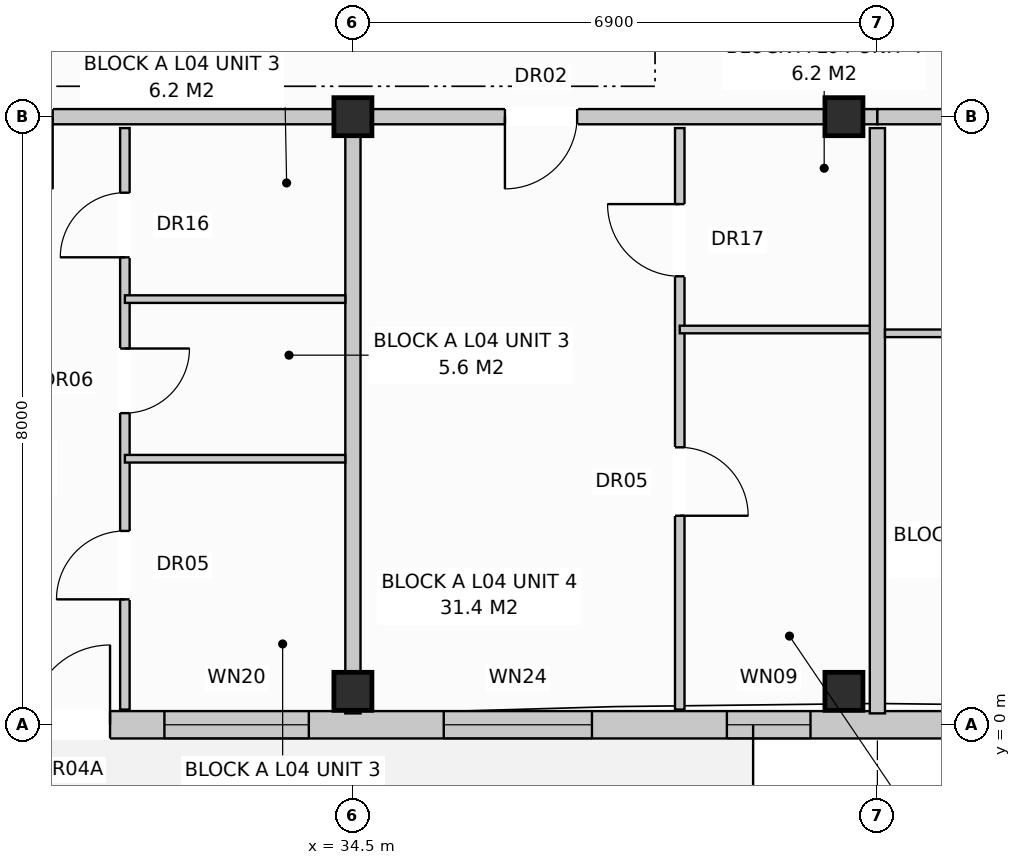
"""IFC4 building model, lengths in metres.
Left out: names, types, materials, properties, quantities, classifications, styles, units other than length and angle.
Written with IfcOpenShell. Run it as: python <this file> out.ifc"""

import sys

from ifc_helpers import new_model, si_unit, direction, frame, frame_2d, origin, origin_with_axes, origin_2d, place, context, subcontext, project, spatial, rectangle, extrude, element, fill, save


model = new_model("IFC4")
c1 = context("Model", 3, precision=1e-05, world=origin(), true_north=direction((0.0, 1.0)))
c2 = subcontext(c1, "Body", "Model", "MODEL_VIEW")
j1 = project(units=[si_unit("LENGTHUNIT", "METRE"), si_unit("PLANEANGLEUNIT", "RADIAN")], contexts=[c1])
p1 = place(None, origin())
s1 = spatial("IfcSite", under=j1, at=p1, CompositionType="ELEMENT")
p2 = place(p1, origin())
s2 = spatial("IfcBuilding", under=s1, at=p2, CompositionType="ELEMENT")
p3 = place(p2, frame((0.0, 0.0, 14.4)))
s3 = spatial("IfcBuildingStorey", under=s2, at=p3, CompositionType="ELEMENT", Elevation=14.4)
for number, where, z_axis, x_axis in (
    (1, (34.5, 0.44, 0.0), (0.0, 0.0, 1.0), (1.0, 0.0, 0.0)),
    (2, (34.5, 8.0, 0.0), (0.0, 0.0, 1.0), (1.0, 0.0, 0.0)),
    (3, (40.96, 0.44, 0.0), (0.0, 0.0, 1.0), (1.0, 0.0, 0.0)),
    (4, (40.96, 8.0, 0.0), (0.0, 0.0, 1.0), (1.0, 0.0, 0.0)),
):
    element("IfcColumn", number, at=place(p3, frame(where, z_axis=z_axis, x_axis=x_axis)), inside=s3, PredefinedType="COLUMN", context=c2, shape_type="SweptSolid", body=[
        extrude(rectangle(XDim=0.5, YDim=0.5, at=origin_2d()), origin(), (0.0, 0.0, 1.0), 3.2),
    ])
p4 = place(p3, frame((0.17, 0.0, 0.0), z_axis=(0.0, 0.0, 1.0), x_axis=(1.0, 0.0, 0.0)))
e5 = element("IfcWall", 5, at=p4, inside=s3, PredefinedType="STANDARD", context=c2, shape_type="SweptSolid", body=[
    extrude(rectangle(XDim=54.86, YDim=0.36, at=frame_2d((27.43, 0.0))), origin(), (0.0, 0.0, 1.0), 2.94),
])
p5 = place(p4, frame((2.485, 0.0, 0.0)))
e6 = element("IfcOpeningElement", 6, at=p5, cuts=e5, PredefinedType="OPENING", context=c2, shape_type="SweptSolid", body=[
    extrude(rectangle(XDim=1.05, YDim=2.12, at=frame_2d((0.525, 1.06))), frame((0.0, 0.192, 0.0), z_axis=(0.0, -1.0, 0.0), x_axis=(1.0, 0.0, 0.0)), (0.0, 0.0, 1.0), 0.384),
])
p6 = place(p4, frame((16.985, 0.0, 0.0)))
e7 = element("IfcOpeningElement", 7, at=p6, cuts=e5, PredefinedType="OPENING", context=c2, shape_type="SweptSolid", body=[
    extrude(rectangle(XDim=1.05, YDim=2.12, at=frame_2d((0.525, 1.06))), frame((0.0, 0.192, 0.0), z_axis=(0.0, -1.0, 0.0), x_axis=(1.0, 0.0, 0.0)), (0.0, 0.0, 1.0), 0.384),
])
p7 = place(p4, frame((30.085, 0.0, 0.0)))
e8 = element("IfcOpeningElement", 8, at=p7, cuts=e5, PredefinedType="OPENING", context=c2, shape_type="SweptSolid", body=[
    extrude(rectangle(XDim=1.05, YDim=2.12, at=frame_2d((0.525, 1.06))), frame((0.0, 0.192, 0.0), z_axis=(0.0, -1.0, 0.0), x_axis=(1.0, 0.0, 0.0)), (0.0, 0.0, 1.0), 0.384),
])
p8 = place(p4, frame((44.141, 0.0, 0.0)))
e9 = element("IfcOpeningElement", 9, at=p8, cuts=e5, PredefinedType="OPENING", context=c2, shape_type="SweptSolid", body=[
    extrude(rectangle(XDim=1.05, YDim=2.12, at=frame_2d((0.525, 1.06))), frame((0.0, 0.192, 0.0), z_axis=(0.0, -1.0, 0.0), x_axis=(1.0, 0.0, 0.0)), (0.0, 0.0, 1.0), 0.384),
])
p9 = place(p4, frame((0.75, 0.0, 0.72)))
e10 = element("IfcOpeningElement", 10, at=p9, cuts=e5, PredefinedType="OPENING", context=c2, shape_type="SweptSolid", body=[
    extrude(rectangle(XDim=1.1, YDim=1.5, at=frame_2d((0.55, 0.75))), frame((0.0, 0.192, 0.0), z_axis=(0.0, -1.0, 0.0), x_axis=(1.0, 0.0, 0.0)), (0.0, 0.0, 1.0), 0.384),
])
p10 = place(p4, frame((4.25, 0.0, 0.72)))
e11 = element("IfcOpeningElement", 11, at=p10, cuts=e5, PredefinedType="OPENING", context=c2, shape_type="SweptSolid", body=[
    extrude(rectangle(XDim=1.9, YDim=1.85, at=frame_2d((0.95, 0.925))), frame((0.0, 0.192, 0.0), z_axis=(0.0, -1.0, 0.0), x_axis=(1.0, 0.0, 0.0)), (0.0, 0.0, 1.0), 0.384),
])
p11 = place(p4, frame((8.925, 0.0, 0.8)))
e12 = element("IfcOpeningElement", 12, at=p11, cuts=e5, PredefinedType="OPENING", context=c2, shape_type="SweptSolid", body=[
    extrude(rectangle(XDim=1.95, YDim=1.65, at=frame_2d((0.975, 0.825))), frame((0.0, 0.192, 0.0), z_axis=(0.0, -1.0, 0.0), x_axis=(1.0, 0.0, 0.0)), (0.0, 0.0, 1.0), 0.384),
])
p12 = place(p4, frame((15.05, 0.0, 0.72)))
e13 = element("IfcOpeningElement", 13, at=p12, cuts=e5, PredefinedType="OPENING", context=c2, shape_type="SweptSolid", body=[
    extrude(rectangle(XDim=1.1, YDim=1.5, at=frame_2d((0.55, 0.75))), frame((0.0, 0.192, 0.0), z_axis=(0.0, -1.0, 0.0), x_axis=(1.0, 0.0, 0.0)), (0.0, 0.0, 1.0), 0.384),
])
p13 = place(p4, frame((21.05, 0.0, 0.72)))
e14 = element("IfcOpeningElement", 14, at=p13, cuts=e5, PredefinedType="OPENING", context=c2, shape_type="SweptSolid", body=[
    extrude(rectangle(XDim=1.9, YDim=1.85, at=frame_2d((0.95, 0.925))), frame((0.0, 0.192, 0.0), z_axis=(0.0, -1.0, 0.0), x_axis=(1.0, 0.0, 0.0)), (0.0, 0.0, 1.0), 0.384),
])
p14 = place(p4, frame((24.85, 0.0, 0.72)))
e15 = element("IfcOpeningElement", 15, at=p14, cuts=e5, PredefinedType="OPENING", context=c2, shape_type="SweptSolid", body=[
    extrude(rectangle(XDim=1.1, YDim=1.5, at=frame_2d((0.55, 0.75))), frame((0.0, 0.192, 0.0), z_axis=(0.0, -1.0, 0.0), x_axis=(1.0, 0.0, 0.0)), (0.0, 0.0, 1.0), 0.384),
])
p15 = place(p4, frame((28.35, 0.0, 0.72)))
e16 = element("IfcOpeningElement", 16, at=p15, cuts=e5, PredefinedType="OPENING", context=c2, shape_type="SweptSolid", body=[
    extrude(rectangle(XDim=1.1, YDim=1.5, at=frame_2d((0.55, 0.75))), frame((0.0, 0.192, 0.0), z_axis=(0.0, -1.0, 0.0), x_axis=(1.0, 0.0, 0.0)), (0.0, 0.0, 1.0), 0.384),
])
p16 = place(p4, frame((31.85, 0.0, 0.72)))
e17 = element("IfcOpeningElement", 17, at=p16, cuts=e5, PredefinedType="OPENING", context=c2, shape_type="SweptSolid", body=[
    extrude(rectangle(XDim=1.9, YDim=1.85, at=frame_2d((0.95, 0.925))), frame((0.0, 0.192, 0.0), z_axis=(0.0, -1.0, 0.0), x_axis=(1.0, 0.0, 0.0)), (0.0, 0.0, 1.0), 0.384),
])
p17 = place(p4, frame((35.525, 0.0, 0.8)))
e18 = element("IfcOpeningElement", 18, at=p17, cuts=e5, PredefinedType="OPENING", context=c2, shape_type="SweptSolid", body=[
    extrude(rectangle(XDim=1.95, YDim=1.65, at=frame_2d((0.975, 0.825))), frame((0.0, 0.192, 0.0), z_axis=(0.0, -1.0, 0.0), x_axis=(1.0, 0.0, 0.0)), (0.0, 0.0, 1.0), 0.384),
])
p18 = place(p4, frame((39.25, 0.0, 0.72)))
e19 = element("IfcOpeningElement", 19, at=p18, cuts=e5, PredefinedType="OPENING", context=c2, shape_type="SweptSolid", body=[
    extrude(rectangle(XDim=1.1, YDim=1.5, at=frame_2d((0.55, 0.75))), frame((0.0, 0.192, 0.0), z_axis=(0.0, -1.0, 0.0), x_axis=(1.0, 0.0, 0.0)), (0.0, 0.0, 1.0), 0.384),
])
p19 = place(p4, frame((42.35, 0.0, 0.72)))
e20 = element("IfcOpeningElement", 20, at=p19, cuts=e5, PredefinedType="OPENING", context=c2, shape_type="SweptSolid", body=[
    extrude(rectangle(XDim=1.1, YDim=1.5, at=frame_2d((0.55, 0.75))), frame((0.0, 0.192, 0.0), z_axis=(0.0, -1.0, 0.0), x_axis=(1.0, 0.0, 0.0)), (0.0, 0.0, 1.0), 0.384),
])
p20 = place(p4, frame((45.725, 0.0, 0.8)))
e21 = element("IfcOpeningElement", 21, at=p20, cuts=e5, PredefinedType="OPENING", context=c2, shape_type="SweptSolid", body=[
    extrude(rectangle(XDim=1.95, YDim=1.65, at=frame_2d((0.975, 0.825))), frame((0.0, 0.192, 0.0), z_axis=(0.0, -1.0, 0.0), x_axis=(1.0, 0.0, 0.0)), (0.0, 0.0, 1.0), 0.384),
])
p21 = place(p4, frame((51.85, 0.0, 0.72)))
e22 = element("IfcOpeningElement", 22, at=p21, cuts=e5, PredefinedType="OPENING", context=c2, shape_type="SweptSolid", body=[
    extrude(rectangle(XDim=1.1, YDim=1.5, at=frame_2d((0.55, 0.75))), frame((0.0, 0.192, 0.0), z_axis=(0.0, -1.0, 0.0), x_axis=(1.0, 0.0, 0.0)), (0.0, 0.0, 1.0), 0.384),
])
p22 = place(p3, frame((34.5, 7.85, 0.0), z_axis=(0.0, 0.0, 1.0), x_axis=(0.0, -1.0, 0.0)))
e23 = element("IfcWall", 23, at=p22, inside=s3, PredefinedType="PARTITIONING", context=c2, shape_type="SweptSolid", body=[
    extrude(rectangle(XDim=7.7, YDim=0.2, at=frame_2d((3.85, 0.0))), origin(), (0.0, 0.0, 1.0), 2.94),
])
p23 = place(p3, frame((27.6, 8.0, 0.0), z_axis=(0.0, 0.0, 1.0), x_axis=(1.0, 0.0, 0.0)))
e24 = element("IfcWall", 24, at=p23, inside=s3, PredefinedType="PARTITIONING", context=c2, shape_type="SweptSolid", body=[
    extrude(rectangle(XDim=6.9, YDim=0.2, at=frame_2d((3.45, 0.0))), origin(), (0.0, 0.0, 1.0), 2.38),
])
p24 = place(p23, frame((2.0, 0.0, 0.0)))
e25 = element("IfcOpeningElement", 25, at=p24, cuts=e24, PredefinedType="OPENING", context=c2, shape_type="SweptSolid", body=[
    extrude(rectangle(XDim=0.95, YDim=2.15, at=frame_2d((0.475, 1.075))), frame((0.0, 0.112, 0.0), z_axis=(0.0, -1.0, 0.0), x_axis=(1.0, 0.0, 0.0)), (0.0, 0.0, 1.0), 0.224),
])
p25 = place(p3, frame((31.5, 7.85, 0.0), z_axis=(0.0, 0.0, 1.0), x_axis=(0.0, -1.0, 0.0)))
e26 = element("IfcWall", 26, at=p25, inside=s3, PredefinedType="PARTITIONING", context=c2, shape_type="SweptSolid", body=[
    extrude(rectangle(XDim=7.65, YDim=0.125, at=frame_2d((3.825, 0.0))), origin(), (0.0, 0.0, 1.0), 2.94),
])
p26 = place(p25, frame((0.85, 0.0, 0.0)))
e27 = element("IfcOpeningElement", 27, at=p26, cuts=e26, PredefinedType="OPENING", context=c2, shape_type="SweptSolid", body=[
    extrude(rectangle(XDim=0.85, YDim=2.1, at=frame_2d((0.425, 1.05))), frame((0.0, 0.074, 0.0), z_axis=(0.0, -1.0, 0.0), x_axis=(1.0, 0.0, 0.0)), (0.0, 0.0, 1.0), 0.149),
])
p27 = place(p25, frame((2.9, 0.0, 0.0)))
e28 = element("IfcOpeningElement", 28, at=p27, cuts=e26, PredefinedType="OPENING", context=c2, shape_type="SweptSolid", body=[
    extrude(rectangle(XDim=0.85, YDim=2.05, at=frame_2d((0.425, 1.025))), frame((0.0, 0.074, 0.0), z_axis=(0.0, -1.0, 0.0), x_axis=(1.0, 0.0, 0.0)), (0.0, 0.0, 1.0), 0.149),
])
p28 = place(p25, frame((5.3, 0.0, 0.0)))
e29 = element("IfcOpeningElement", 29, at=p28, cuts=e26, PredefinedType="OPENING", context=c2, shape_type="SweptSolid", body=[
    extrude(rectangle(XDim=0.9, YDim=2.1, at=frame_2d((0.45, 1.05))), frame((0.0, 0.074, 0.0), z_axis=(0.0, -1.0, 0.0), x_axis=(1.0, 0.0, 0.0)), (0.0, 0.0, 1.0), 0.149),
])
for number, where, z_axis, x_axis in (
    (30, (31.5, 5.6, 0.0), (0.0, 0.0, 1.0), (1.0, 0.0, 0.0)),
    (31, (31.5, 3.5, 0.0), (0.0, 0.0, 1.0), (1.0, 0.0, 0.0)),
):
    element("IfcWall", number, at=place(p3, frame(where, z_axis=z_axis, x_axis=x_axis)), inside=s3, PredefinedType="PARTITIONING", context=c2, shape_type="SweptSolid", body=[
        extrude(rectangle(XDim=2.9, YDim=0.1, at=frame_2d((1.45, 0.0))), origin(), (0.0, 0.0, 1.0), 2.94),
    ])
p29 = place(p3, frame((41.4, 7.85, 0.0), z_axis=(0.0, 0.0, 1.0), x_axis=(0.0, -1.0, 0.0)))
e32 = element("IfcWall", 32, at=p29, inside=s3, PredefinedType="PARTITIONING", context=c2, shape_type="SweptSolid", body=[
    extrude(rectangle(XDim=7.7, YDim=0.2, at=frame_2d((3.85, 0.0))), origin(), (0.0, 0.0, 1.0), 2.94),
])
p30 = place(p3, frame((34.5, 8.0, 0.0), z_axis=(0.0, 0.0, 1.0), x_axis=(1.0, 0.0, 0.0)))
e33 = element("IfcWall", 33, at=p30, inside=s3, PredefinedType="PARTITIONING", context=c2, shape_type="SweptSolid", body=[
    extrude(rectangle(XDim=6.9, YDim=0.2, at=frame_2d((3.45, 0.0))), origin(), (0.0, 0.0, 1.0), 2.38),
])
p31 = place(p30, frame((2.0, 0.0, 0.0)))
e34 = element("IfcOpeningElement", 34, at=p31, cuts=e33, PredefinedType="OPENING", context=c2, shape_type="SweptSolid", body=[
    extrude(rectangle(XDim=0.95, YDim=2.15, at=frame_2d((0.475, 1.075))), frame((0.0, 0.112, 0.0), z_axis=(0.0, -1.0, 0.0), x_axis=(1.0, 0.0, 0.0)), (0.0, 0.0, 1.0), 0.224),
])
p32 = place(p3, frame((38.8, 7.85, 0.0), z_axis=(0.0, 0.0, 1.0), x_axis=(0.0, -1.0, 0.0)))
e35 = element("IfcWall", 35, at=p32, inside=s3, PredefinedType="PARTITIONING", context=c2, shape_type="SweptSolid", body=[
    extrude(rectangle(XDim=7.65, YDim=0.125, at=frame_2d((3.825, 0.0))), origin(), (0.0, 0.0, 1.0), 2.94),
])
p33 = place(p32, frame((1.0, 0.0, 0.0)))
e36 = element("IfcOpeningElement", 36, at=p33, cuts=e35, PredefinedType="OPENING", context=c2, shape_type="SweptSolid", body=[
    extrude(rectangle(XDim=0.95, YDim=2.1, at=frame_2d((0.475, 1.05))), frame((0.0, 0.074, 0.0), z_axis=(0.0, -1.0, 0.0), x_axis=(1.0, 0.0, 0.0)), (0.0, 0.0, 1.0), 0.149),
])
p34 = place(p32, frame((4.2, 0.0, 0.0)))
e37 = element("IfcOpeningElement", 37, at=p34, cuts=e35, PredefinedType="OPENING", context=c2, shape_type="SweptSolid", body=[
    extrude(rectangle(XDim=0.9, YDim=2.1, at=frame_2d((0.45, 1.05))), frame((0.0, 0.074, 0.0), z_axis=(0.0, -1.0, 0.0), x_axis=(1.0, 0.0, 0.0)), (0.0, 0.0, 1.0), 0.149),
])
p35 = place(p3, frame((38.8, 5.2, 0.0), z_axis=(0.0, 0.0, 1.0), x_axis=(1.0, 0.0, 0.0)))
e38 = element("IfcWall", 38, at=p35, inside=s3, PredefinedType="PARTITIONING", context=c2, shape_type="SweptSolid", body=[
    extrude(rectangle(XDim=2.5, YDim=0.1, at=frame_2d((1.25, 0.0))), origin(), (0.0, 0.0, 1.0), 2.94),
])
p36 = place(p3, frame((41.4, 8.0, 0.0), z_axis=(0.0, 0.0, 1.0), x_axis=(1.0, 0.0, 0.0)))
e39 = element("IfcWall", 39, at=p36, inside=s3, PredefinedType="PARTITIONING", context=c2, shape_type="SweptSolid", body=[
    extrude(rectangle(XDim=13.8, YDim=0.2, at=frame_2d((6.9, 0.0))), origin(), (0.0, 0.0, 1.0), 2.38),
])
p37 = place(p36, frame((9.6, 0.0, 0.0)))
e40 = element("IfcOpeningElement", 40, at=p37, cuts=e39, PredefinedType="OPENING", context=c2, shape_type="SweptSolid", body=[
    extrude(rectangle(XDim=0.95, YDim=2.15, at=frame_2d((0.475, 1.075))), frame((0.0, 0.112, 0.0), z_axis=(0.0, -1.0, 0.0), x_axis=(1.0, 0.0, 0.0)), (0.0, 0.0, 1.0), 0.224),
])
p38 = place(p3, frame((41.5, 5.15, 0.0), z_axis=(0.0, 0.0, 1.0), x_axis=(1.0, 0.0, 0.0)))
e41 = element("IfcWall", 41, at=p38, inside=s3, PredefinedType="PARTITIONING", context=c2, shape_type="SweptSolid", body=[
    extrude(rectangle(XDim=8.6, YDim=0.1, at=frame_2d((4.3, 0.0))), origin(), (0.0, 0.0, 1.0), 2.94),
])
p39 = place(p38, frame((1.4, 0.0, 0.0)))
e42 = element("IfcOpeningElement", 42, at=p39, cuts=e41, PredefinedType="OPENING", context=c2, shape_type="SweptSolid", body=[
    extrude(rectangle(XDim=0.85, YDim=2.05, at=frame_2d((0.425, 1.025))), frame((0.0, 0.062, 0.0), z_axis=(0.0, -1.0, 0.0), x_axis=(1.0, 0.0, 0.0)), (0.0, 0.0, 1.0), 0.124),
])
p40 = place(p38, frame((4.65, 0.0, 0.0)))
e43 = element("IfcOpeningElement", 43, at=p40, cuts=e41, PredefinedType="OPENING", context=c2, shape_type="SweptSolid", body=[
    extrude(rectangle(XDim=0.85, YDim=2.05, at=frame_2d((0.425, 1.025))), frame((0.0, 0.062, 0.0), z_axis=(0.0, -1.0, 0.0), x_axis=(1.0, 0.0, 0.0)), (0.0, 0.0, 1.0), 0.124),
])
p41 = place(p38, frame((6.8, 0.0, 0.0)))
e44 = element("IfcOpeningElement", 44, at=p41, cuts=e41, PredefinedType="OPENING", context=c2, shape_type="SweptSolid", body=[
    extrude(rectangle(XDim=0.85, YDim=2.1, at=frame_2d((0.425, 1.05))), frame((0.0, 0.062, 0.0), z_axis=(0.0, -1.0, 0.0), x_axis=(1.0, 0.0, 0.0)), (0.0, 0.0, 1.0), 0.124),
])
p42 = place(p7, origin_with_axes())
e45 = element("IfcDoor", 45, at=p42, inside=s3, OperationType="SINGLE_SWING_RIGHT", PredefinedType="DOOR", context=c2, shape_type="SweptSolid", body=[
    extrude(rectangle(XDim=1.05, YDim=2.12, at=frame_2d((0.525, 1.06))), frame((0.0, 0.025, 0.0), z_axis=(0.0, -1.0, 0.0), x_axis=(1.0, 0.0, 0.0)), (0.0, 0.0, 1.0), 0.05),
])
fill(e8, e45)
p43 = place(p16, origin_with_axes())
e46 = element("IfcWindow", 46, at=p43, inside=s3, PartitioningType="SINGLE_PANEL", PredefinedType="WINDOW", context=c2, shape_type="SweptSolid", body=[
    extrude(rectangle(XDim=1.9, YDim=1.85, at=frame_2d((0.95, 0.925))), frame((0.0, 0.03, 0.0), z_axis=(0.0, -1.0, 0.0), x_axis=(1.0, 0.0, 0.0)), (0.0, 0.0, 1.0), 0.06),
])
fill(e17, e46)
p44 = place(p17, origin_with_axes())
e47 = element("IfcWindow", 47, at=p44, inside=s3, PartitioningType="SINGLE_PANEL", PredefinedType="WINDOW", context=c2, shape_type="SweptSolid", body=[
    extrude(rectangle(XDim=1.95, YDim=1.65, at=frame_2d((0.975, 0.825))), frame((0.0, 0.03, 0.0), z_axis=(0.0, -1.0, 0.0), x_axis=(1.0, 0.0, 0.0)), (0.0, 0.0, 1.0), 0.06),
])
fill(e18, e47)
p45 = place(p18, origin_with_axes())
e48 = element("IfcWindow", 48, at=p45, inside=s3, PartitioningType="SINGLE_PANEL", PredefinedType="WINDOW", context=c2, shape_type="SweptSolid", body=[
    extrude(rectangle(XDim=1.1, YDim=1.5, at=frame_2d((0.55, 0.75))), frame((0.0, 0.03, 0.0), z_axis=(0.0, -1.0, 0.0), x_axis=(1.0, 0.0, 0.0)), (0.0, 0.0, 1.0), 0.06),
])
fill(e19, e48)
p46 = place(p26, frame((0.85, 0.0, 0.0), z_axis=(0.0, 0.0, 1.0), x_axis=(-1.0, 0.0, 0.0)))
e49 = element("IfcDoor", 49, at=p46, inside=s3, OperationType="SINGLE_SWING_RIGHT", PredefinedType="DOOR", context=c2, shape_type="SweptSolid", body=[
    extrude(rectangle(XDim=0.85, YDim=2.1, at=frame_2d((0.425, 1.05))), frame((0.0, 0.025, 0.0), z_axis=(0.0, -1.0, 0.0), x_axis=(1.0, 0.0, 0.0)), (0.0, 0.0, 1.0), 0.05),
])
fill(e27, e49)
p47 = place(p27, origin_with_axes())
e50 = element("IfcDoor", 50, at=p47, inside=s3, OperationType="SINGLE_SWING_LEFT", PredefinedType="DOOR", context=c2, shape_type="SweptSolid", body=[
    extrude(rectangle(XDim=0.85, YDim=2.05, at=frame_2d((0.425, 1.025))), frame((0.0, 0.025, 0.0), z_axis=(0.0, -1.0, 0.0), x_axis=(1.0, 0.0, 0.0)), (0.0, 0.0, 1.0), 0.05),
])
fill(e28, e50)
p48 = place(p28, frame((0.9, 0.0, 0.0), z_axis=(0.0, 0.0, 1.0), x_axis=(-1.0, 0.0, 0.0)))
e51 = element("IfcDoor", 51, at=p48, inside=s3, OperationType="SINGLE_SWING_RIGHT", PredefinedType="DOOR", context=c2, shape_type="SweptSolid", body=[
    extrude(rectangle(XDim=0.9, YDim=2.1, at=frame_2d((0.45, 1.05))), frame((0.0, 0.025, 0.0), z_axis=(0.0, -1.0, 0.0), x_axis=(1.0, 0.0, 0.0)), (0.0, 0.0, 1.0), 0.05),
])
fill(e29, e51)
p49 = place(p31, frame((0.95, 0.0, 0.0), z_axis=(0.0, 0.0, 1.0), x_axis=(-1.0, 0.0, 0.0)))
e52 = element("IfcDoor", 52, at=p49, inside=s3, OperationType="SINGLE_SWING_LEFT", PredefinedType="DOOR", context=c2, shape_type="SweptSolid", body=[
    extrude(rectangle(XDim=0.95, YDim=2.15, at=frame_2d((0.475, 1.075))), frame((0.0, 0.025, 0.0), z_axis=(0.0, -1.0, 0.0), x_axis=(1.0, 0.0, 0.0)), (0.0, 0.0, 1.0), 0.05),
])
fill(e34, e52)
p50 = place(p33, frame((0.95, 0.0, 0.0), z_axis=(0.0, 0.0, 1.0), x_axis=(-1.0, 0.0, 0.0)))
e53 = element("IfcDoor", 53, at=p50, inside=s3, OperationType="SINGLE_SWING_LEFT", PredefinedType="DOOR", context=c2, shape_type="SweptSolid", body=[
    extrude(rectangle(XDim=0.95, YDim=2.1, at=frame_2d((0.475, 1.05))), frame((0.0, 0.025, 0.0), z_axis=(0.0, -1.0, 0.0), x_axis=(1.0, 0.0, 0.0)), (0.0, 0.0, 1.0), 0.05),
])
fill(e36, e53)
p51 = place(p34, origin_with_axes())
e54 = element("IfcDoor", 54, at=p51, inside=s3, OperationType="SINGLE_SWING_RIGHT", PredefinedType="DOOR", context=c2, shape_type="SweptSolid", body=[
    extrude(rectangle(XDim=0.9, YDim=2.1, at=frame_2d((0.45, 1.05))), frame((0.0, 0.025, 0.0), z_axis=(0.0, -1.0, 0.0), x_axis=(1.0, 0.0, 0.0)), (0.0, 0.0, 1.0), 0.05),
])
fill(e37, e54)
save(model, sys.argv[1])
